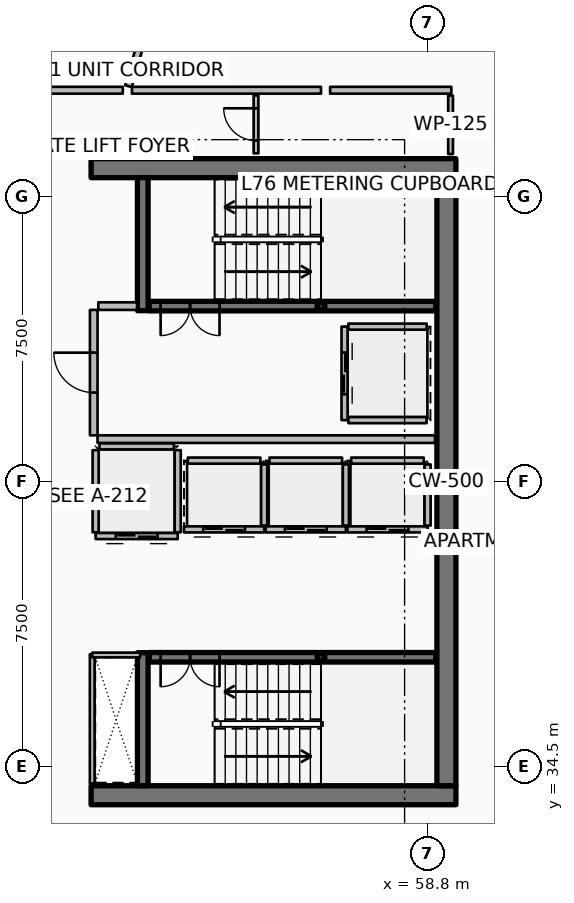
"""IFC4 building model, lengths in metres.
Left out: names, types, materials, properties, quantities, classifications, styles, units other than length and angle.
Written with IfcOpenShell. Run it as: python <this file> out.ifc"""

import sys

from ifc_helpers import new_model, si_unit, direction, frame, frame_2d, origin, origin_2d, place, context, subcontext, project, spatial, rectangle, hollow_rectangle, extrude, element, fill, save


model = new_model("IFC4")
c1 = context("Model", 3, precision=1e-05, world=origin(), true_north=direction((0.0, 1.0)))
c2 = subcontext(c1, "Body", "Model", "MODEL_VIEW")
j1 = project(units=[si_unit("LENGTHUNIT", "METRE"), si_unit("PLANEANGLEUNIT", "RADIAN")], contexts=[c1])
p1 = place(None, origin())
s1 = spatial("IfcSite", under=j1, at=p1, CompositionType="ELEMENT")
p2 = place(p1, origin())
s2 = spatial("IfcBuilding", under=s1, at=p2, CompositionType="ELEMENT")
p3 = place(p2, frame((0.0, 0.0, 302.15)))
s3 = spatial("IfcBuildingStorey", under=s2, at=p3, CompositionType="ELEMENT", Elevation=302.15)
for number, where, z_axis, x_axis in (
    (1, (49.95, 33.75, 0.0), (0.0, 0.0, 1.0), (1.0, 0.0, 0.0)),
    (2, (49.95, 50.25, 0.0), (0.0, 0.0, 1.0), (1.0, 0.0, 0.0)),
):
    element("IfcWall", number, at=place(p3, frame(where, z_axis=z_axis, x_axis=x_axis)), inside=s3, PredefinedType="SHEAR", context=c2, shape_type="SweptSolid", body=[
        extrude(rectangle(XDim=9.6, YDim=0.5, at=frame_2d((4.8, 0.0))), origin(), (0.0, 0.0, 1.0), 3.85),
    ])
p4 = place(p3, frame((59.3, 34.0, 0.0), z_axis=(0.0, 0.0, 1.0), x_axis=(0.0, 1.0, 0.0)))
e3 = element("IfcWall", 3, at=p4, inside=s3, PredefinedType="SHEAR", context=c2, shape_type="SweptSolid", body=[
    extrude(rectangle(XDim=16.0, YDim=0.5, at=frame_2d((8.0, 0.0))), origin(), (0.0, 0.0, 1.0), 3.85),
])
for number, where, z_axis, x_axis in (
    (4, (51.31, 46.5, 0.0), (0.0, 0.0, 1.0), (0.0, 1.0, 0.0)),
    (5, (51.31, 34.0, 0.0), (0.0, 0.0, 1.0), (0.0, 1.0, 0.0)),
):
    element("IfcWall", number, at=place(p3, frame(where, z_axis=z_axis, x_axis=x_axis)), inside=s3, PredefinedType="SHEAR", context=c2, shape_type="SweptSolid", body=[
        extrude(rectangle(XDim=3.5, YDim=0.28, at=frame_2d((1.75, 0.0))), origin(), (0.0, 0.0, 1.0), 3.85),
    ])
for number, where, z_axis, x_axis in (
    (6, (56.0, 46.62, 0.0), (0.0, 0.0, 1.0), (1.0, 0.0, 0.0)),
    (7, (56.0, 37.38, 0.0), (0.0, 0.0, 1.0), (1.0, 0.0, 0.0)),
):
    element("IfcColumn", number, at=place(p3, frame(where, z_axis=z_axis, x_axis=x_axis)), inside=s3, PredefinedType="COLUMN", context=c2, shape_type="SweptSolid", body=[
        extrude(hollow_rectangle(XDim=0.2, YDim=0.2, WallThickness=0.01, InnerFilletRadius=0.01, OuterFilletRadius=0.02, at=origin_2d()), origin(), (0.0, 0.0, 1.0), 1.72),
    ])
p5 = place(p3, frame((51.48, 46.62, 0.0), z_axis=(0.0, 0.0, 1.0), x_axis=(1.0, 0.0, 0.0)))
e8 = element("IfcWall", 8, at=p5, inside=s3, PredefinedType="SOLIDWALL", context=c2, shape_type="SweptSolid", body=[
    extrude(rectangle(XDim=7.54, YDim=0.25, at=frame_2d((3.77, 0.0))), origin(), (0.0, 0.0, 1.0), 3.45),
])
p6 = place(p5, frame((0.3, 0.0, 0.0)))
e9 = element("IfcOpeningElement", 9, at=p6, cuts=e8, PredefinedType="OPENING", context=c2, shape_type="SweptSolid", body=[
    extrude(rectangle(XDim=1.55, YDim=2.15, at=frame_2d((0.775, 1.075))), frame((0.0, 0.135, 0.0), z_axis=(0.0, -1.0, 0.0), x_axis=(1.0, 0.0, 0.0)), (0.0, 0.0, 1.0), 0.27),
])
p7 = place(p3, frame((51.48, 37.38, 0.0), z_axis=(0.0, 0.0, 1.0), x_axis=(1.0, 0.0, 0.0)))
e10 = element("IfcWall", 10, at=p7, inside=s3, PredefinedType="SOLIDWALL", context=c2, shape_type="SweptSolid", body=[
    extrude(rectangle(XDim=7.54, YDim=0.25, at=frame_2d((3.77, 0.0))), origin(), (0.0, 0.0, 1.0), 3.45),
])
p8 = place(p7, frame((0.3, 0.0, 0.0)))
e11 = element("IfcOpeningElement", 11, at=p8, cuts=e10, PredefinedType="OPENING", context=c2, shape_type="SweptSolid", body=[
    extrude(rectangle(XDim=1.55, YDim=2.15, at=frame_2d((0.775, 1.075))), frame((0.0, 0.135, 0.0), z_axis=(0.0, -1.0, 0.0), x_axis=(1.0, 0.0, 0.0)), (0.0, 0.0, 1.0), 0.27),
])
p9 = place(p3, frame((54.505, 40.745, 0.0), z_axis=(0.0, 0.0, 1.0), x_axis=(-1.0, 0.0, 0.0)))
e12 = element("IfcWall", 12, at=p9, inside=s3, PredefinedType="PARTITIONING", context=c2, shape_type="SweptSolid", body=[
    extrude(rectangle(XDim=2.11, YDim=0.16, at=frame_2d((1.055, 0.0))), origin(), (0.0, 0.0, 1.0), 3.45),
])
p10 = place(p9, frame((0.505, 0.0, 0.0)))
e13 = element("IfcOpeningElement", 13, at=p10, cuts=e12, PredefinedType="OPENING", context=c2, shape_type="SweptSolid", body=[
    extrude(rectangle(XDim=1.1, YDim=2.1, at=frame_2d((0.55, 1.05))), frame((0.0, 0.09, 0.0), z_axis=(0.0, -1.0, 0.0), x_axis=(1.0, 0.0, 0.0)), (0.0, 0.0, 1.0), 0.18),
])
p11 = place(p3, frame((54.505, 40.845, 0.0), z_axis=(0.0, 0.0, 1.0), x_axis=(0.0, 1.0, 0.0)))
e14 = element("IfcWall", 14, at=p11, inside=s3, PredefinedType="PARTITIONING", context=c2, shape_type="SweptSolid", body=[
    extrude(rectangle(XDim=1.61, YDim=0.16, at=frame_2d((0.805, 0.0))), origin(), (0.0, 0.0, 1.0), 3.45),
])
p12 = place(p3, frame((52.495, 42.555, 0.0), z_axis=(0.0, 0.0, 1.0), x_axis=(1.0, 0.0, 0.0)))
e15 = element("IfcWall", 15, at=p12, inside=s3, PredefinedType="PARTITIONING", context=c2, shape_type="SweptSolid", body=[
    extrude(rectangle(XDim=1.91, YDim=0.16, at=frame_2d((0.955, 0.0))), origin(), (0.0, 0.0, 1.0), 3.45),
])
p13 = place(p3, frame((56.655, 40.745, 0.0), z_axis=(0.0, 0.0, 1.0), x_axis=(-1.0, 0.0, 0.0)))
e16 = element("IfcWall", 16, at=p13, inside=s3, PredefinedType="PARTITIONING", context=c2, shape_type="SweptSolid", body=[
    extrude(rectangle(XDim=2.11, YDim=0.16, at=frame_2d((1.055, 0.0))), origin(), (0.0, 0.0, 1.0), 3.45),
])
p14 = place(p13, frame((0.505, 0.0, 0.0)))
e17 = element("IfcOpeningElement", 17, at=p14, cuts=e16, PredefinedType="OPENING", context=c2, shape_type="SweptSolid", body=[
    extrude(rectangle(XDim=1.1, YDim=2.1, at=frame_2d((0.55, 1.05))), frame((0.0, 0.09, 0.0), z_axis=(0.0, -1.0, 0.0), x_axis=(1.0, 0.0, 0.0)), (0.0, 0.0, 1.0), 0.18),
])
p15 = place(p3, frame((56.655, 40.845, 0.0), z_axis=(0.0, 0.0, 1.0), x_axis=(0.0, 1.0, 0.0)))
e18 = element("IfcWall", 18, at=p15, inside=s3, PredefinedType="PARTITIONING", context=c2, shape_type="SweptSolid", body=[
    extrude(rectangle(XDim=1.61, YDim=0.16, at=frame_2d((0.805, 0.0))), origin(), (0.0, 0.0, 1.0), 3.45),
])
p16 = place(p3, frame((54.645, 42.555, 0.0), z_axis=(0.0, 0.0, 1.0), x_axis=(1.0, 0.0, 0.0)))
e19 = element("IfcWall", 19, at=p16, inside=s3, PredefinedType="PARTITIONING", context=c2, shape_type="SweptSolid", body=[
    extrude(rectangle(XDim=1.91, YDim=0.16, at=frame_2d((0.955, 0.0))), origin(), (0.0, 0.0, 1.0), 3.45),
])
p17 = place(p3, frame((58.805, 40.745, 0.0), z_axis=(0.0, 0.0, 1.0), x_axis=(-1.0, 0.0, 0.0)))
e20 = element("IfcWall", 20, at=p17, inside=s3, PredefinedType="PARTITIONING", context=c2, shape_type="SweptSolid", body=[
    extrude(rectangle(XDim=2.11, YDim=0.16, at=frame_2d((1.055, 0.0))), origin(), (0.0, 0.0, 1.0), 3.45),
])
p18 = place(p17, frame((0.505, 0.0, 0.0)))
e21 = element("IfcOpeningElement", 21, at=p18, cuts=e20, PredefinedType="OPENING", context=c2, shape_type="SweptSolid", body=[
    extrude(rectangle(XDim=1.1, YDim=2.1, at=frame_2d((0.55, 1.05))), frame((0.0, 0.09, 0.0), z_axis=(0.0, -1.0, 0.0), x_axis=(1.0, 0.0, 0.0)), (0.0, 0.0, 1.0), 0.18),
])
p19 = place(p3, frame((58.805, 40.845, 0.0), z_axis=(0.0, 0.0, 1.0), x_axis=(0.0, 1.0, 0.0)))
e22 = element("IfcWall", 22, at=p19, inside=s3, PredefinedType="PARTITIONING", context=c2, shape_type="SweptSolid", body=[
    extrude(rectangle(XDim=1.61, YDim=0.16, at=frame_2d((0.805, 0.0))), origin(), (0.0, 0.0, 1.0), 3.45),
])
p20 = place(p3, frame((56.795, 42.555, 0.0), z_axis=(0.0, 0.0, 1.0), x_axis=(1.0, 0.0, 0.0)))
e23 = element("IfcWall", 23, at=p20, inside=s3, PredefinedType="PARTITIONING", context=c2, shape_type="SweptSolid", body=[
    extrude(rectangle(XDim=1.91, YDim=0.16, at=frame_2d((0.955, 0.0))), origin(), (0.0, 0.0, 1.0), 3.45),
])
p21 = place(p3, frame((56.62, 46.08, 0.0), z_axis=(0.0, 0.0, 1.0), x_axis=(0.0, -1.0, 0.0)))
e24 = element("IfcWall", 24, at=p21, inside=s3, PredefinedType="PARTITIONING", context=c2, shape_type="SweptSolid", body=[
    extrude(rectangle(XDim=2.46, YDim=0.16, at=frame_2d((1.23, 0.0))), origin(), (0.0, 0.0, 1.0), 3.45),
])
p22 = place(p21, frame((0.68, 0.0, 0.0)))
e25 = element("IfcOpeningElement", 25, at=p22, cuts=e24, PredefinedType="OPENING", context=c2, shape_type="SweptSolid", body=[
    extrude(rectangle(XDim=1.1, YDim=2.1, at=frame_2d((0.55, 1.05))), frame((0.0, 0.09, 0.0), z_axis=(0.0, -1.0, 0.0), x_axis=(1.0, 0.0, 0.0)), (0.0, 0.0, 1.0), 0.18),
])
for number, where, z_axis, x_axis in (
    (26, (56.72, 46.08, 0.0), (0.0, 0.0, 1.0), (1.0, 0.0, 0.0)),
    (27, (56.72, 43.62, 0.0), (0.0, 0.0, 1.0), (1.0, 0.0, 0.0)),
):
    element("IfcWall", number, at=place(p3, frame(where, z_axis=z_axis, x_axis=x_axis)), inside=s3, PredefinedType="PARTITIONING", context=c2, shape_type="SweptSolid", body=[
        extrude(rectangle(XDim=2.06, YDim=0.16, at=frame_2d((1.03, 0.0))), origin(), (0.0, 0.0, 1.0), 3.45),
    ])
p23 = place(p3, frame((52.23, 40.57, 0.0), z_axis=(0.0, 0.0, 1.0), x_axis=(-1.0, 0.0, 0.0)))
e28 = element("IfcWall", 28, at=p23, inside=s3, PredefinedType="PARTITIONING", context=c2, shape_type="SweptSolid", body=[
    extrude(rectangle(XDim=2.16, YDim=0.16, at=frame_2d((1.08, 0.0))), origin(), (0.0, 0.0, 1.0), 3.45),
])
p24 = place(p23, frame((0.53, 0.0, 0.0)))
e29 = element("IfcOpeningElement", 29, at=p24, cuts=e28, PredefinedType="OPENING", context=c2, shape_type="SweptSolid", body=[
    extrude(rectangle(XDim=1.1, YDim=2.1, at=frame_2d((0.55, 1.05))), frame((0.0, 0.09, 0.0), z_axis=(0.0, -1.0, 0.0), x_axis=(1.0, 0.0, 0.0)), (0.0, 0.0, 1.0), 0.18),
])
for number, where, z_axis, x_axis in (
    (30, (52.23, 40.67, 0.0), (0.0, 0.0, 1.0), (0.0, 1.0, 0.0)),
    (31, (50.07, 40.67, 0.0), (0.0, 0.0, 1.0), (0.0, 1.0, 0.0)),
):
    element("IfcWall", number, at=place(p3, frame(where, z_axis=z_axis, x_axis=x_axis)), inside=s3, PredefinedType="PARTITIONING", context=c2, shape_type="SweptSolid", body=[
        extrude(rectangle(XDim=2.16, YDim=0.16, at=frame_2d((1.08, 0.0))), origin(), (0.0, 0.0, 1.0), 3.45),
    ])
p25 = place(p3, frame((50.17, 42.93, 0.0), z_axis=(0.0, 0.0, 1.0), x_axis=(1.0, 0.0, 0.0)))
e32 = element("IfcWall", 32, at=p25, inside=s3, PredefinedType="PARTITIONING", context=c2, shape_type="SweptSolid", body=[
    extrude(rectangle(XDim=1.96, YDim=0.16, at=frame_2d((0.98, 0.0))), origin(), (0.0, 0.0, 1.0), 3.45),
])
p26 = place(p3, frame((50.12, 43.12, 0.0), z_axis=(0.0, 0.0, 1.0), x_axis=(1.0, 0.0, 0.0)))
e33 = element("IfcWall", 33, at=p26, inside=s3, PredefinedType="PARTITIONING", context=c2, shape_type="SweptSolid", body=[
    extrude(rectangle(XDim=8.88, YDim=0.2, at=frame_2d((4.44, 0.0))), origin(), (0.0, 0.0, 1.0), 3.45),
])
p27 = place(p3, frame((50.14, 46.62, 0.0), z_axis=(0.0, 0.0, 1.0), x_axis=(1.0, 0.0, 0.0)))
e34 = element("IfcWall", 34, at=p27, inside=s3, PredefinedType="PARTITIONING", context=c2, shape_type="SweptSolid", body=[
    extrude(rectangle(XDim=1.02, YDim=0.2, at=frame_2d((0.51, 0.0))), origin(), (0.0, 0.0, 1.0), 3.45),
])
p28 = place(p3, frame((50.02, 43.22, 0.0), z_axis=(0.0, 0.0, 1.0), x_axis=(0.0, 1.0, 0.0)))
e35 = element("IfcWall", 35, at=p28, inside=s3, PredefinedType="PARTITIONING", context=c2, shape_type="SweptSolid", body=[
    extrude(rectangle(XDim=3.3, YDim=0.2, at=frame_2d((1.65, 0.0))), origin(), (0.0, 0.0, 1.0), 3.45),
])
p29 = place(p28, frame((1.125, 0.0, 0.0)))
e36 = element("IfcOpeningElement", 36, at=p29, cuts=e35, PredefinedType="OPENING", context=c2, shape_type="SweptSolid", body=[
    extrude(rectangle(XDim=1.05, YDim=2.1, at=frame_2d((0.525, 1.05))), frame((0.0, 0.11, 0.0), z_axis=(0.0, -1.0, 0.0), x_axis=(1.0, 0.0, 0.0)), (0.0, 0.0, 1.0), 0.22),
])
p30 = place(p3, frame((49.98, 34.06, 0.0), z_axis=(0.0, 0.0, 1.0), x_axis=(0.0, 1.0, 0.0)))
e37 = element("IfcWall", 37, at=p30, inside=s3, PredefinedType="PARTITIONING", context=c2, shape_type="SweptSolid", body=[
    extrude(rectangle(XDim=3.4, YDim=0.125, at=frame_2d((1.7, 0.0))), origin(), (0.0, 0.0, 1.0), 2.89),
])
p31 = place(p3, frame((49.98, 37.44, 0.0), z_axis=(0.0, 0.0, 1.0), x_axis=(1.0, 0.0, 0.0)))
e38 = element("IfcWall", 38, at=p31, inside=s3, PredefinedType="PARTITIONING", context=c2, shape_type="SweptSolid", body=[
    extrude(rectangle(XDim=1.26, YDim=0.125, at=frame_2d((0.63, 0.0))), origin(), (0.0, 0.0, 1.0), 2.89),
])
p32 = place(p3, frame((59.41, 50.62, 0.0), z_axis=(0.0, 0.0, 1.0), x_axis=(0.0, 1.0, 0.0)))
e39 = element("IfcWall", 39, at=p32, inside=s3, PredefinedType="PARTITIONING", context=c2, shape_type="SweptSolid", body=[
    extrude(rectangle(XDim=1.54, YDim=0.125, at=frame_2d((0.77, 0.0))), origin(), (0.0, 0.0, 1.0), 2.89),
])
p33 = place(p3, frame((54.29, 50.64, 0.0), z_axis=(0.0, 0.0, 1.0), x_axis=(0.0, 1.0, 0.0)))
e40 = element("IfcWall", 40, at=p33, inside=s3, PredefinedType="PARTITIONING", context=c2, shape_type="SweptSolid", body=[
    extrude(rectangle(XDim=1.52, YDim=0.125, at=frame_2d((0.76, 0.0))), origin(), (0.0, 0.0, 1.0), 2.89),
])
p34 = place(p33, frame((0.335, 0.0, 0.0)))
e41 = element("IfcOpeningElement", 41, at=p34, cuts=e40, PredefinedType="OPENING", context=c2, shape_type="SweptSolid", body=[
    extrude(rectangle(XDim=0.85, YDim=2.06, at=frame_2d((0.425, 1.03))), frame((0.0, 0.073, 0.0), z_axis=(0.0, -1.0, 0.0), x_axis=(1.0, 0.0, 0.0)), (0.0, 0.0, 1.0), 0.145),
])
p35 = place(p3, frame((50.935, 52.406, 0.0), z_axis=(0.0, 0.0, 1.0), x_axis=(0.27143972755, 0.962455440167, 0.0)))
e42 = element("IfcWall", 42, at=p35, inside=s3, PredefinedType="PARTITIONING", context=c2, shape_type="SweptSolid", body=[
    extrude(rectangle(XDim=16.173, YDim=0.18, at=frame_2d((8.086, 0.0))), origin(), (0.0, 0.0, 1.0), 2.407),
])
p36 = place(p3, frame((50.785, 52.3, 0.0), z_axis=(0.0, 0.0, 1.0), x_axis=(-1.0, 0.0, 0.0)))
e43 = element("IfcWall", 43, at=p36, inside=s3, PredefinedType="PARTITIONING", context=c2, shape_type="SweptSolid", body=[
    extrude(rectangle(XDim=3.884, YDim=0.18, at=frame_2d((1.942, 0.0))), origin(), (0.0, 0.0, 1.0), 2.407),
])
p37 = place(p3, frame((59.43, 52.3, 0.0), z_axis=(0.0, 0.0, 1.0), x_axis=(-1.0, 0.0, 0.0)))
e44 = element("IfcWall", 44, at=p37, inside=s3, PredefinedType="PARTITIONING", context=c2, shape_type="SweptSolid", body=[
    extrude(rectangle(XDim=3.19, YDim=0.18, at=frame_2d((1.595, 0.0))), origin(), (0.0, 0.0, 1.0), 2.407),
])
p38 = place(p3, frame((56.0, 52.3, 0.0), z_axis=(0.0, 0.0, 1.0), x_axis=(-1.0, 0.0, 0.0)))
e45 = element("IfcWall", 45, at=p38, inside=s3, PredefinedType="PARTITIONING", context=c2, shape_type="SweptSolid", body=[
    extrude(rectangle(XDim=4.975, YDim=0.18, at=frame_2d((2.488, 0.0))), origin(), (0.0, 0.0, 1.0), 2.407),
])
p39 = place(p6, origin())
e46 = element("IfcDoor", 46, at=p39, inside=s3, OperationType="DOUBLE_DOOR_SINGLE_SWING", PredefinedType="DOOR", context=c2, shape_type="SweptSolid", body=[
    extrude(rectangle(XDim=1.55, YDim=2.15, at=frame_2d((0.775, 1.075))), frame((0.0, 0.025, 0.0), z_axis=(0.0, -1.0, 0.0), x_axis=(1.0, 0.0, 0.0)), (0.0, 0.0, 1.0), 0.05),
])
fill(e9, e46)
p40 = place(p8, origin())
e47 = element("IfcDoor", 47, at=p40, inside=s3, OperationType="DOUBLE_DOOR_SINGLE_SWING", PredefinedType="DOOR", context=c2, shape_type="SweptSolid", body=[
    extrude(rectangle(XDim=1.55, YDim=2.15, at=frame_2d((0.775, 1.075))), frame((0.0, 0.025, 0.0), z_axis=(0.0, -1.0, 0.0), x_axis=(1.0, 0.0, 0.0)), (0.0, 0.0, 1.0), 0.05),
])
fill(e11, e47)
p41 = place(p10, origin())
e48 = element("IfcDoor", 48, at=p41, inside=s3, OperationType="DOUBLE_DOOR_SLIDING", PredefinedType="DOOR", context=c2, shape_type="SweptSolid", body=[
    extrude(rectangle(XDim=1.1, YDim=2.1, at=frame_2d((0.55, 1.05))), frame((0.0, 0.025, 0.0), z_axis=(0.0, -1.0, 0.0), x_axis=(1.0, 0.0, 0.0)), (0.0, 0.0, 1.0), 0.05),
])
fill(e13, e48)
p42 = place(p14, origin())
e49 = element("IfcDoor", 49, at=p42, inside=s3, OperationType="DOUBLE_DOOR_SLIDING", PredefinedType="DOOR", context=c2, shape_type="SweptSolid", body=[
    extrude(rectangle(XDim=1.1, YDim=2.1, at=frame_2d((0.55, 1.05))), frame((0.0, 0.025, 0.0), z_axis=(0.0, -1.0, 0.0), x_axis=(1.0, 0.0, 0.0)), (0.0, 0.0, 1.0), 0.05),
])
fill(e17, e49)
p43 = place(p18, origin())
e50 = element("IfcDoor", 50, at=p43, inside=s3, OperationType="DOUBLE_DOOR_SLIDING", PredefinedType="DOOR", context=c2, shape_type="SweptSolid", body=[
    extrude(rectangle(XDim=1.1, YDim=2.1, at=frame_2d((0.55, 1.05))), frame((0.0, 0.025, 0.0), z_axis=(0.0, -1.0, 0.0), x_axis=(1.0, 0.0, 0.0)), (0.0, 0.0, 1.0), 0.05),
])
fill(e21, e50)
p44 = place(p22, origin())
e51 = element("IfcDoor", 51, at=p44, inside=s3, OperationType="DOUBLE_DOOR_SLIDING", PredefinedType="DOOR", context=c2, shape_type="SweptSolid", body=[
    extrude(rectangle(XDim=1.1, YDim=2.1, at=frame_2d((0.55, 1.05))), frame((0.0, 0.025, 0.0), z_axis=(0.0, -1.0, 0.0), x_axis=(1.0, 0.0, 0.0)), (0.0, 0.0, 1.0), 0.05),
])
fill(e25, e51)
p45 = place(p24, origin())
e52 = element("IfcDoor", 52, at=p45, inside=s3, OperationType="DOUBLE_DOOR_SLIDING", PredefinedType="DOOR", context=c2, shape_type="SweptSolid", body=[
    extrude(rectangle(XDim=1.1, YDim=2.1, at=frame_2d((0.55, 1.05))), frame((0.0, 0.025, 0.0), z_axis=(0.0, -1.0, 0.0), x_axis=(1.0, 0.0, 0.0)), (0.0, 0.0, 1.0), 0.05),
])
fill(e29, e52)
p46 = place(p29, origin())
e53 = element("IfcDoor", 53, at=p46, inside=s3, OperationType="SINGLE_SWING_RIGHT", PredefinedType="DOOR", context=c2, shape_type="SweptSolid", body=[
    extrude(rectangle(XDim=1.05, YDim=2.1, at=frame_2d((0.525, 1.05))), frame((0.0, 0.025, 0.0), z_axis=(0.0, -1.0, 0.0), x_axis=(1.0, 0.0, 0.0)), (0.0, 0.0, 1.0), 0.05),
])
fill(e36, e53)
p47 = place(p34, origin())
e54 = element("IfcDoor", 54, at=p47, inside=s3, OperationType="SINGLE_SWING_RIGHT", PredefinedType="DOOR", context=c2, shape_type="SweptSolid", body=[
    extrude(rectangle(XDim=0.85, YDim=2.06, at=frame_2d((0.425, 1.03))), frame((0.0, 0.025, 0.0), z_axis=(0.0, -1.0, 0.0), x_axis=(1.0, 0.0, 0.0)), (0.0, 0.0, 1.0), 0.05),
])
fill(e41, e54)
save(model, sys.argv[1])
